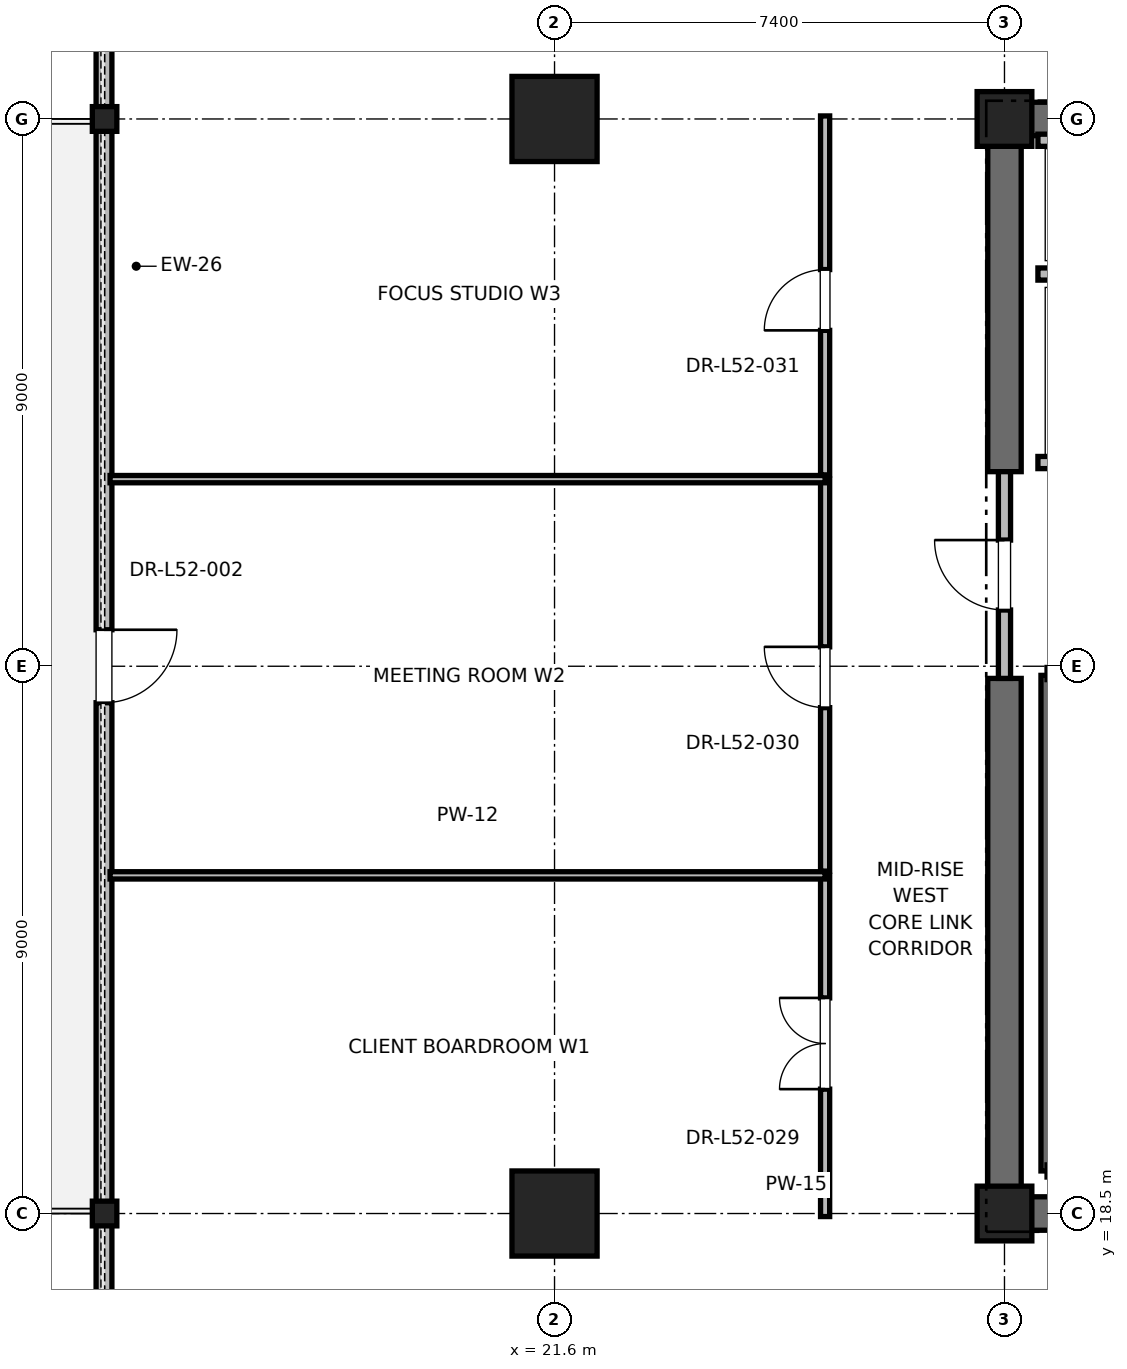
"""IFC4 building model, lengths in metres.
Left out: names, types, materials, properties, quantities, classifications, styles, units other than length and angle.
Written with IfcOpenShell. Run it as: python <this file> out.ifc"""

import sys

from ifc_helpers import new_model, si_unit, direction, frame, frame_2d, origin, origin_2d, place, context, subcontext, project, spatial, rectangle, i_section, extrude, element, fill, save


model = new_model("IFC4")
c1 = context("Model", 3, precision=1e-05, world=origin(), true_north=direction((0.0, 1.0)))
c2 = subcontext(c1, "Body", "Model", "MODEL_VIEW")
j1 = project(units=[si_unit("LENGTHUNIT", "METRE"), si_unit("PLANEANGLEUNIT", "RADIAN")], contexts=[c1])
p1 = place(None, origin())
s1 = spatial("IfcSite", under=j1, at=p1, CompositionType="ELEMENT")
p2 = place(p1, origin())
s2 = spatial("IfcBuilding", under=s1, at=p2, CompositionType="ELEMENT")
p3 = place(p2, frame((0.0, 0.0, 225.2)))
s3 = spatial("IfcBuildingStorey", under=s2, at=p3, CompositionType="ELEMENT", Elevation=225.2)
for number, where, z_axis, x_axis in (
    (1, (21.6, 18.5, 0.0), (0.0, 0.0, 1.0), (1.0, 0.0, 0.0)),
    (2, (21.6, 36.5, 0.0), (0.0, 0.0, 1.0), (1.0, 0.0, 0.0)),
):
    element("IfcColumn", number, at=place(p3, frame(where, z_axis=z_axis, x_axis=x_axis)), inside=s3, PredefinedType="COLUMN", context=c2, shape_type="SweptSolid", body=[
        extrude(rectangle(XDim=1.4, YDim=1.4, at=origin_2d()), origin(), (0.0, 0.0, 1.0), 4.0),
    ])
for number, where, z_axis, x_axis in (
    (3, (14.2, 18.5, 0.0), (0.0, 0.0, 1.0), (1.0, 0.0, 0.0)),
    (4, (14.2, 36.5, 0.0), (0.0, 0.0, 1.0), (1.0, 0.0, 0.0)),
):
    element("IfcColumn", number, at=place(p3, frame(where, z_axis=z_axis, x_axis=x_axis)), inside=s3, PredefinedType="COLUMN", context=c2, shape_type="SweptSolid", body=[
        extrude(i_section(OverallWidth=0.403, OverallDepth=0.406, WebThickness=0.027, FlangeThickness=0.043, FilletRadius=0.015, at=origin_2d()), origin(), (0.0, 0.0, 1.0), 4.0),
    ])
for number, where, z_axis, x_axis in (
    (5, (29.0, 18.5, 0.0), (0.0, 0.0, 1.0), (1.0, 0.0, 0.0)),
    (6, (29.0, 36.5, 0.0), (0.0, 0.0, 1.0), (1.0, 0.0, 0.0)),
):
    element("IfcColumn", number, at=place(p3, frame(where, z_axis=z_axis, x_axis=x_axis)), inside=s3, PredefinedType="PILASTER", context=c2, shape_type="SweptSolid", body=[
        extrude(rectangle(XDim=0.9, YDim=0.9, at=origin_2d()), origin(), (0.0, 0.0, 1.0), 4.0),
    ])
p4 = place(p3, frame((29.0, 18.5, 0.0), z_axis=(0.0, 0.0, 1.0), x_axis=(1.0, 0.0, 0.0)))
e7 = element("IfcWall", 7, at=p4, inside=s3, PredefinedType="SHEAR", context=c2, shape_type="SweptSolid", body=[
    extrude(rectangle(XDim=9.2, YDim=0.55, at=frame_2d((4.6, 0.0))), origin(), (0.0, 0.0, 1.0), 3.775),
])
p5 = place(p3, frame((29.0, 36.5, 0.0), z_axis=(0.0, 0.0, 1.0), x_axis=(1.0, 0.0, 0.0)))
e8 = element("IfcWall", 8, at=p5, inside=s3, PredefinedType="SHEAR", context=c2, shape_type="SweptSolid", body=[
    extrude(rectangle(XDim=5.8, YDim=0.55, at=frame_2d((2.9, 0.0))), origin(), (0.0, 0.0, 1.0), 3.775),
])
p6 = place(p3, frame((29.0, 18.5, 0.0), z_axis=(0.0, 0.0, 1.0), x_axis=(0.0, 1.0, 0.0)))
e9 = element("IfcWall", 9, at=p6, inside=s3, PredefinedType="SHEAR", context=c2, shape_type="SweptSolid", body=[
    extrude(rectangle(XDim=8.8, YDim=0.55, at=frame_2d((4.4, 0.0))), origin(), (0.0, 0.0, 1.0), 3.775),
])
p7 = place(p3, frame((29.0, 30.7, 0.0), z_axis=(0.0, 0.0, 1.0), x_axis=(0.0, 1.0, 0.0)))
e10 = element("IfcWall", 10, at=p7, inside=s3, PredefinedType="SHEAR", context=c2, shape_type="SweptSolid", body=[
    extrude(rectangle(XDim=5.8, YDim=0.55, at=frame_2d((2.9, 0.0))), origin(), (0.0, 0.0, 1.0), 3.775),
])
p8 = place(p3, frame((14.19, 46.256, 0.0), z_axis=(0.0, 0.0, 1.0), x_axis=(0.0, -1.0, 0.0)))
e11 = element("IfcWall", 11, at=p8, inside=s3, PredefinedType="PARAPET", context=c2, shape_type="SweptSolid", body=[
    extrude(rectangle(XDim=37.513, YDim=0.26, at=frame_2d((18.756, 0.0))), origin(), (0.0, 0.0, 1.0), 3.047),
])
p9 = place(p8, frame((4.2, 0.0, 0.85)))
e12 = element("IfcOpeningElement", 12, at=p9, cuts=e11, PredefinedType="OPENING", context=c2, shape_type="SweptSolid", body=[
    extrude(rectangle(XDim=2.0, YDim=2.3, at=frame_2d((1.0, 1.15))), frame((0.0, 0.13, 0.0), z_axis=(0.0, -1.0, 0.0), x_axis=(1.0, 0.0, 0.0)), (0.0, 0.0, 1.0), 0.26),
])
p10 = place(p8, frame((18.156, 0.0, 0.0)))
e13 = element("IfcOpeningElement", 13, at=p10, cuts=e11, PredefinedType="OPENING", context=c2, shape_type="SweptSolid", body=[
    extrude(rectangle(XDim=1.2, YDim=2.2, at=frame_2d((0.6, 1.1))), frame((0.0, 0.13, 0.0), z_axis=(0.0, -1.0, 0.0), x_axis=(1.0, 0.0, 0.0)), (0.0, 0.0, 1.0), 0.26),
])
p11 = place(p8, frame((31.312, 0.0, 0.85)))
e14 = element("IfcOpeningElement", 14, at=p11, cuts=e11, PredefinedType="OPENING", context=c2, shape_type="SweptSolid", body=[
    extrude(rectangle(XDim=2.0, YDim=2.3, at=frame_2d((1.0, 1.15))), frame((0.0, 0.13, 0.0), z_axis=(0.0, -1.0, 0.0), x_axis=(1.0, 0.0, 0.0)), (0.0, 0.0, 1.0), 0.26),
])
p12 = place(p3, frame((29.7, 19.2, 0.0), z_axis=(0.0, 0.0, 1.0), x_axis=(0.0, 1.0, 0.0)))
e15 = element("IfcWall", 15, at=p12, inside=s3, PredefinedType="SOLIDWALL", context=c2, shape_type="SweptSolid", body=[
    extrude(rectangle(XDim=8.15, YDim=0.2, at=frame_2d((4.075, 0.0))), origin(), (0.0, 0.0, 1.0), 3.775),
])
p13 = place(p3, frame((29.0, 27.3, 0.0), z_axis=(0.0, 0.0, 1.0), x_axis=(0.0, 1.0, 0.0)))
e16 = element("IfcWall", 16, at=p13, inside=s3, PredefinedType="PARTITIONING", context=c2, shape_type="SweptSolid", body=[
    extrude(rectangle(XDim=3.4, YDim=0.2, at=frame_2d((1.7, 0.0))), origin(), (0.0, 0.0, 1.0), 2.755),
])
p14 = place(p13, frame((1.125, 0.0, 0.0)))
e17 = element("IfcOpeningElement", 17, at=p14, cuts=e16, PredefinedType="OPENING", context=c2, shape_type="SweptSolid", body=[
    extrude(rectangle(XDim=1.15, YDim=2.2, at=frame_2d((0.575, 1.1))), frame((0.0, 0.1, 0.0), z_axis=(0.0, -1.0, 0.0), x_axis=(1.0, 0.0, 0.0)), (0.0, 0.0, 1.0), 0.2),
])
p15 = place(p3, frame((29.55, 30.85, 0.0), z_axis=(0.0, 0.0, 1.0), x_axis=(1.0, 0.0, 0.0)))
e18 = element("IfcWall", 18, at=p15, inside=s3, PredefinedType="SOLIDWALL", context=c2, shape_type="SweptSolid", body=[
    extrude(rectangle(XDim=2.6, YDim=0.2, at=frame_2d((1.3, 0.0))), origin(), (0.0, 0.0, 1.0), 2.755),
])
p16 = place(p15, frame((0.75, 0.0, 0.0)))
e19 = element("IfcOpeningElement", 19, at=p16, cuts=e18, PredefinedType="OPENING", context=c2, shape_type="SweptSolid", body=[
    extrude(rectangle(XDim=1.1, YDim=2.2, at=frame_2d((0.55, 1.1))), frame((0.0, 0.1, 0.0), z_axis=(0.0, -1.0, 0.0), x_axis=(1.0, 0.0, 0.0)), (0.0, 0.0, 1.0), 0.2),
])
p17 = place(p3, frame((29.55, 33.95, 0.0), z_axis=(0.0, 0.0, 1.0), x_axis=(1.0, 0.0, 0.0)))
e20 = element("IfcWall", 20, at=p17, inside=s3, PredefinedType="SOLIDWALL", context=c2, shape_type="SweptSolid", body=[
    extrude(rectangle(XDim=2.8, YDim=0.2, at=frame_2d((1.4, 0.0))), origin(), (0.0, 0.0, 1.0), 3.775),
])
p18 = place(p3, frame((32.35, 36.15, 0.0), z_axis=(0.0, 0.0, 1.0), x_axis=(-1.0, 0.0, 0.0)))
e21 = element("IfcWall", 21, at=p18, inside=s3, PredefinedType="SOLIDWALL", context=c2, shape_type="SweptSolid", body=[
    extrude(rectangle(XDim=2.8, YDim=0.2, at=frame_2d((1.4, 0.0))), origin(), (0.0, 0.0, 1.0), 3.062),
])
p19 = place(p3, frame((26.05, 18.45, 0.0), z_axis=(0.0, 0.0, 1.0), x_axis=(0.0, 1.0, 0.0)))
e22 = element("IfcWall", 22, at=p19, inside=s3, PredefinedType="PARTITIONING", context=c2, shape_type="SweptSolid", body=[
    extrude(rectangle(XDim=5.611, YDim=0.15, at=frame_2d((2.806, 0.0))), origin(), (0.0, 0.0, 1.0), 2.85),
])
p20 = place(p19, frame((2.095, 0.0, 0.0)))
e23 = element("IfcOpeningElement", 23, at=p20, cuts=e22, PredefinedType="OPENING", context=c2, shape_type="SweptSolid", body=[
    extrude(rectangle(XDim=1.5, YDim=2.25, at=frame_2d((0.75, 1.125))), frame((0.0, 0.075, 0.0), z_axis=(0.0, -1.0, 0.0), x_axis=(1.0, 0.0, 0.0)), (0.0, 0.0, 1.0), 0.15),
])
p21 = place(p3, frame((14.29, 24.061, 0.0), z_axis=(0.0, 0.0, 1.0), x_axis=(1.0, 0.0, 0.0)))
e24 = element("IfcWall", 24, at=p21, inside=s3, PredefinedType="PARTITIONING", context=c2, shape_type="SweptSolid", body=[
    extrude(rectangle(XDim=11.76, YDim=0.12, at=frame_2d((5.88, 0.0))), origin(), (0.0, 0.0, 1.0), 2.85),
])
p22 = place(p3, frame((26.05, 24.131, 0.0), z_axis=(0.0, 0.0, 1.0), x_axis=(0.0, 1.0, 0.0)))
e25 = element("IfcWall", 25, at=p22, inside=s3, PredefinedType="PARTITIONING", context=c2, shape_type="SweptSolid", body=[
    extrude(rectangle(XDim=6.446, YDim=0.15, at=frame_2d((3.223, 0.0))), origin(), (0.0, 0.0, 1.0), 2.85),
])
p23 = place(p22, frame((2.688, 0.0, 0.0)))
e26 = element("IfcOpeningElement", 26, at=p23, cuts=e25, PredefinedType="OPENING", context=c2, shape_type="SweptSolid", body=[
    extrude(rectangle(XDim=1.0, YDim=2.15, at=frame_2d((0.5, 1.075))), frame((0.0, 0.075, 0.0), z_axis=(0.0, -1.0, 0.0), x_axis=(1.0, 0.0, 0.0)), (0.0, 0.0, 1.0), 0.15),
])
p24 = place(p3, frame((14.29, 30.577, 0.0), z_axis=(0.0, 0.0, 1.0), x_axis=(1.0, 0.0, 0.0)))
e27 = element("IfcWall", 27, at=p24, inside=s3, PredefinedType="PARTITIONING", context=c2, shape_type="SweptSolid", body=[
    extrude(rectangle(XDim=11.76, YDim=0.12, at=frame_2d((5.88, 0.0))), origin(), (0.0, 0.0, 1.0), 2.85),
])
p25 = place(p3, frame((26.05, 30.647, 0.0), z_axis=(0.0, 0.0, 1.0), x_axis=(0.0, 1.0, 0.0)))
e28 = element("IfcWall", 28, at=p25, inside=s3, PredefinedType="PARTITIONING", context=c2, shape_type="SweptSolid", body=[
    extrude(rectangle(XDim=5.903, YDim=0.15, at=frame_2d((2.952, 0.0))), origin(), (0.0, 0.0, 1.0), 2.85),
])
p26 = place(p25, frame((2.376, 0.0, 0.0)))
e29 = element("IfcOpeningElement", 29, at=p26, cuts=e28, PredefinedType="OPENING", context=c2, shape_type="SweptSolid", body=[
    extrude(rectangle(XDim=1.0, YDim=2.15, at=frame_2d((0.5, 1.075))), frame((0.0, 0.075, 0.0), z_axis=(0.0, -1.0, 0.0), x_axis=(1.0, 0.0, 0.0)), (0.0, 0.0, 1.0), 0.15),
])
p27 = place(p10, origin())
e30 = element("IfcDoor", 30, at=p27, inside=s3, OperationType="SINGLE_SWING_LEFT", PredefinedType="DOOR", context=c2, shape_type="SweptSolid", body=[
    extrude(rectangle(XDim=1.2, YDim=2.2, at=frame_2d((0.6, 1.1))), frame((0.0, 0.025, 0.0), z_axis=(0.0, -1.0, 0.0), x_axis=(1.0, 0.0, 0.0)), (0.0, 0.0, 1.0), 0.05),
])
fill(e13, e30)
p28 = place(p14, origin())
e31 = element("IfcDoor", 31, at=p28, inside=s3, OperationType="SINGLE_SWING_RIGHT", PredefinedType="DOOR", context=c2, shape_type="SweptSolid", body=[
    extrude(rectangle(XDim=1.15, YDim=2.2, at=frame_2d((0.575, 1.1))), frame((0.0, 0.025, 0.0), z_axis=(0.0, -1.0, 0.0), x_axis=(1.0, 0.0, 0.0)), (0.0, 0.0, 1.0), 0.05),
])
fill(e17, e31)
p29 = place(p20, origin())
e32 = element("IfcDoor", 32, at=p29, inside=s3, OperationType="DOUBLE_DOOR_SINGLE_SWING", PredefinedType="DOOR", context=c2, shape_type="SweptSolid", body=[
    extrude(rectangle(XDim=1.5, YDim=2.25, at=frame_2d((0.75, 1.125))), frame((0.0, 0.025, 0.0), z_axis=(0.0, -1.0, 0.0), x_axis=(1.0, 0.0, 0.0)), (0.0, 0.0, 1.0), 0.05),
])
fill(e23, e32)
p30 = place(p23, origin())
e33 = element("IfcDoor", 33, at=p30, inside=s3, OperationType="SINGLE_SWING_RIGHT", PredefinedType="DOOR", context=c2, shape_type="SweptSolid", body=[
    extrude(rectangle(XDim=1.0, YDim=2.15, at=frame_2d((0.5, 1.075))), frame((0.0, 0.025, 0.0), z_axis=(0.0, -1.0, 0.0), x_axis=(1.0, 0.0, 0.0)), (0.0, 0.0, 1.0), 0.05),
])
fill(e26, e33)
p31 = place(p26, origin())
e34 = element("IfcDoor", 34, at=p31, inside=s3, OperationType="SINGLE_SWING_LEFT", PredefinedType="DOOR", context=c2, shape_type="SweptSolid", body=[
    extrude(rectangle(XDim=1.0, YDim=2.15, at=frame_2d((0.5, 1.075))), frame((0.0, 0.025, 0.0), z_axis=(0.0, -1.0, 0.0), x_axis=(1.0, 0.0, 0.0)), (0.0, 0.0, 1.0), 0.05),
])
fill(e29, e34)
save(model, sys.argv[1])
